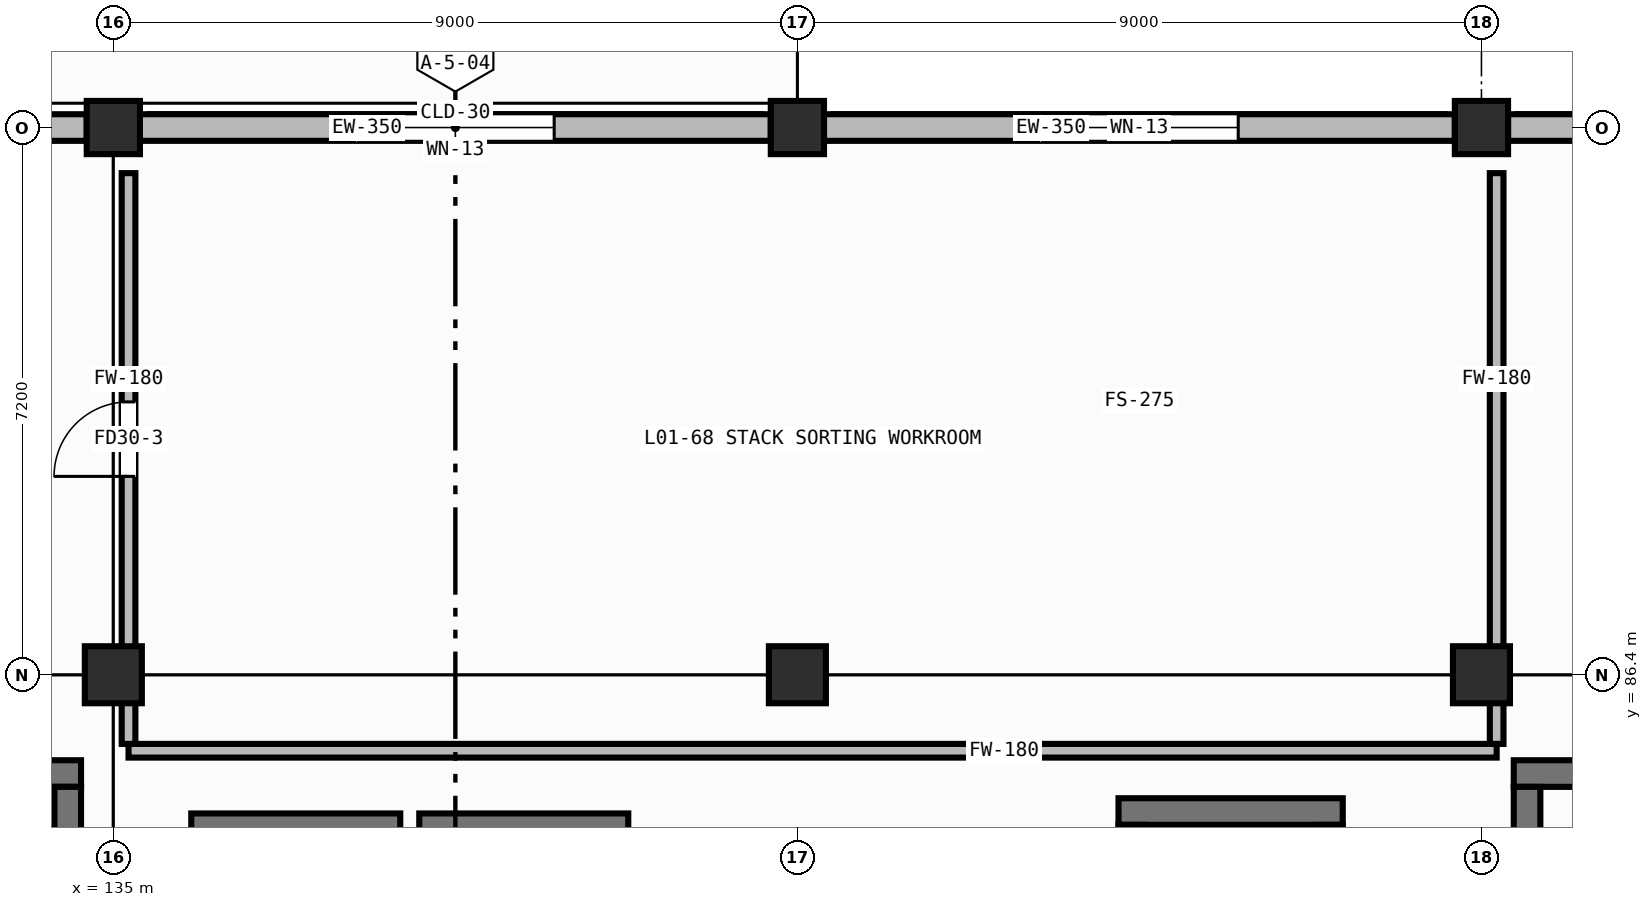
"""IFC4 building model, lengths in metres.
Left out: names, types, materials, properties, quantities, classifications, styles, units other than length and angle.
Written with IfcOpenShell. Run it as: python <this file> out.ifc"""

import sys

from ifc_helpers import new_model, si_unit, direction, frame, frame_2d, origin, origin_2d, place, context, subcontext, project, spatial, rectangle, hollow_rectangle, extrude, element, fill, save


model = new_model("IFC4")
c1 = context("Model", 3, precision=1e-05, world=origin(), true_north=direction((0.0, 1.0)))
c2 = subcontext(c1, "Body", "Model", "MODEL_VIEW")
j1 = project(units=[si_unit("LENGTHUNIT", "METRE"), si_unit("PLANEANGLEUNIT", "RADIAN")], contexts=[c1])
p1 = place(None, origin())
s1 = spatial("IfcSite", under=j1, at=p1, CompositionType="ELEMENT")
p2 = place(p1, origin())
s2 = spatial("IfcBuilding", under=s1, at=p2, CompositionType="ELEMENT")
p3 = place(p2, origin())
s3 = spatial("IfcBuildingStorey", under=s2, at=p3, CompositionType="ELEMENT", Elevation=0.0)
p4 = place(p3, frame((135.0, 86.4, 0.0), z_axis=(0.0, 0.0, 1.0), x_axis=(1.0, 0.0, 0.0)))
e1 = element("IfcColumn", 1, at=p4, inside=s3, PredefinedType="COLUMN", context=c2, shape_type="SweptSolid", body=[
    extrude(hollow_rectangle(XDim=0.75, YDim=0.75, WallThickness=0.032, at=origin_2d()), origin(), (0.0, 0.0, 1.0), 4.8),
])
p5 = place(p3, frame((135.0, 93.6, 0.0), z_axis=(0.0, 0.0, 1.0), x_axis=(1.0, 0.0, 0.0)))
e2 = element("IfcColumn", 2, at=p5, inside=s3, PredefinedType="COLUMN", context=c2, shape_type="SweptSolid", body=[
    extrude(hollow_rectangle(XDim=0.7, YDim=0.7, WallThickness=0.028, at=origin_2d()), origin(), (0.0, 0.0, 1.0), 4.8),
])
p6 = place(p3, frame((144.0, 86.4, 0.0), z_axis=(0.0, 0.0, 1.0), x_axis=(1.0, 0.0, 0.0)))
e3 = element("IfcColumn", 3, at=p6, inside=s3, PredefinedType="COLUMN", context=c2, shape_type="SweptSolid", body=[
    extrude(hollow_rectangle(XDim=0.75, YDim=0.75, WallThickness=0.032, at=origin_2d()), origin(), (0.0, 0.0, 1.0), 4.8),
])
p7 = place(p3, frame((144.0, 93.6, 0.0), z_axis=(0.0, 0.0, 1.0), x_axis=(1.0, 0.0, 0.0)))
e4 = element("IfcColumn", 4, at=p7, inside=s3, PredefinedType="COLUMN", context=c2, shape_type="SweptSolid", body=[
    extrude(hollow_rectangle(XDim=0.7, YDim=0.7, WallThickness=0.028, at=origin_2d()), origin(), (0.0, 0.0, 1.0), 4.8),
])
p8 = place(p3, frame((153.0, 86.4, 0.0), z_axis=(0.0, 0.0, 1.0), x_axis=(1.0, 0.0, 0.0)))
e5 = element("IfcColumn", 5, at=p8, inside=s3, PredefinedType="COLUMN", context=c2, shape_type="SweptSolid", body=[
    extrude(hollow_rectangle(XDim=0.75, YDim=0.75, WallThickness=0.032, at=origin_2d()), origin(), (0.0, 0.0, 1.0), 4.8),
])
p9 = place(p3, frame((153.0, 93.6, 0.0), z_axis=(0.0, 0.0, 1.0), x_axis=(1.0, 0.0, 0.0)))
e6 = element("IfcColumn", 6, at=p9, inside=s3, PredefinedType="COLUMN", context=c2, shape_type="SweptSolid", body=[
    extrude(hollow_rectangle(XDim=0.7, YDim=0.7, WallThickness=0.028, at=origin_2d()), origin(), (0.0, 0.0, 1.0), 4.8),
])
p10 = place(p3, frame((134.65, 93.6, 0.0), z_axis=(0.0, 0.0, 1.0), x_axis=(-1.0, 0.0, 0.0)))
e7 = element("IfcWall", 7, at=p10, inside=s3, PredefinedType="STANDARD", context=c2, shape_type="SweptSolid", body=[
    extrude(rectangle(XDim=8.3, YDim=0.35, at=frame_2d((4.15, 0.0))), origin(), (0.0, 0.0, 1.0), 4.055),
])
p11 = place(p10, frame((3.225, 0.0, 0.0)))
e8 = element("IfcOpeningElement", 8, at=p11, cuts=e7, PredefinedType="OPENING", context=c2, shape_type="SweptSolid", body=[
    extrude(rectangle(XDim=1.85, YDim=2.35, at=frame_2d((0.925, 1.175))), frame((0.0, 0.187, 0.0), z_axis=(0.0, -1.0, 0.0), x_axis=(1.0, 0.0, 0.0)), (0.0, 0.0, 1.0), 0.374),
])
p12 = place(p3, frame((143.65, 93.6, 0.0), z_axis=(0.0, 0.0, 1.0), x_axis=(-1.0, 0.0, 0.0)))
e9 = element("IfcWall", 9, at=p12, inside=s3, PredefinedType="STANDARD", context=c2, shape_type="SweptSolid", body=[
    extrude(rectangle(XDim=8.3, YDim=0.35, at=frame_2d((4.15, 0.0))), origin(), (0.0, 0.0, 1.0), 4.055),
])
p13 = place(p12, frame((2.85, 0.0, 0.85)))
e10 = element("IfcOpeningElement", 10, at=p13, cuts=e9, PredefinedType="OPENING", context=c2, shape_type="SweptSolid", body=[
    extrude(rectangle(XDim=2.6, YDim=1.6, at=frame_2d((1.3, 0.8))), frame((0.0, 0.187, 0.0), z_axis=(0.0, -1.0, 0.0), x_axis=(1.0, 0.0, 0.0)), (0.0, 0.0, 1.0), 0.374),
])
p14 = place(p3, frame((152.65, 93.6, 0.0), z_axis=(0.0, 0.0, 1.0), x_axis=(-1.0, 0.0, 0.0)))
e11 = element("IfcWall", 11, at=p14, inside=s3, PredefinedType="STANDARD", context=c2, shape_type="SweptSolid", body=[
    extrude(rectangle(XDim=8.3, YDim=0.35, at=frame_2d((4.15, 0.0))), origin(), (0.0, 0.0, 1.0), 4.055),
])
p15 = place(p14, frame((2.85, 0.0, 0.85)))
e12 = element("IfcOpeningElement", 12, at=p15, cuts=e11, PredefinedType="OPENING", context=c2, shape_type="SweptSolid", body=[
    extrude(rectangle(XDim=2.6, YDim=1.6, at=frame_2d((1.3, 0.8))), frame((0.0, 0.187, 0.0), z_axis=(0.0, -1.0, 0.0), x_axis=(1.0, 0.0, 0.0)), (0.0, 0.0, 1.0), 0.374),
])
p16 = place(p3, frame((161.65, 93.6, 0.0), z_axis=(0.0, 0.0, 1.0), x_axis=(-1.0, 0.0, 0.0)))
e13 = element("IfcWall", 13, at=p16, inside=s3, PredefinedType="STANDARD", context=c2, shape_type="SweptSolid", body=[
    extrude(rectangle(XDim=8.3, YDim=0.35, at=frame_2d((4.15, 0.0))), origin(), (0.0, 0.0, 1.0), 4.055),
])
p17 = place(p16, frame((2.85, 0.0, 0.85)))
e14 = element("IfcOpeningElement", 14, at=p17, cuts=e13, PredefinedType="OPENING", context=c2, shape_type="SweptSolid", body=[
    extrude(rectangle(XDim=2.6, YDim=1.6, at=frame_2d((1.3, 0.8))), frame((0.0, 0.187, 0.0), z_axis=(0.0, -1.0, 0.0), x_axis=(1.0, 0.0, 0.0)), (0.0, 0.0, 1.0), 0.374),
])
p18 = place(p3, frame((126.425, 85.1, 0.0), z_axis=(0.0, 0.0, 1.0), x_axis=(1.0, 0.0, 0.0)))
e15 = element("IfcWall", 15, at=p18, inside=s3, PredefinedType="SHEAR", context=c2, shape_type="SweptSolid", body=[
    extrude(rectangle(XDim=8.15, YDim=0.35, at=frame_2d((4.075, 0.0))), origin(), (0.0, 0.0, 1.0), 4.555),
])
p19 = place(p3, frame((134.4, 81.375, 0.0), z_axis=(0.0, 0.0, 1.0), x_axis=(0.0, 1.0, 0.0)))
e16 = element("IfcWall", 16, at=p19, inside=s3, PredefinedType="SHEAR", context=c2, shape_type="SweptSolid", body=[
    extrude(rectangle(XDim=3.55, YDim=0.35, at=frame_2d((1.775, 0.0))), origin(), (0.0, 0.0, 1.0), 4.555),
])
p20 = place(p3, frame((153.425, 85.1, 0.0), z_axis=(0.0, 0.0, 1.0), x_axis=(1.0, 0.0, 0.0)))
e17 = element("IfcWall", 17, at=p20, inside=s3, PredefinedType="SHEAR", context=c2, shape_type="SweptSolid", body=[
    extrude(rectangle(XDim=8.15, YDim=0.35, at=frame_2d((4.075, 0.0))), origin(), (0.0, 0.0, 1.0), 4.555),
])
p21 = place(p3, frame((153.6, 81.375, 0.0), z_axis=(0.0, 0.0, 1.0), x_axis=(0.0, 1.0, 0.0)))
e18 = element("IfcWall", 18, at=p21, inside=s3, PredefinedType="SHEAR", context=c2, shape_type="SweptSolid", body=[
    extrude(rectangle(XDim=3.55, YDim=0.35, at=frame_2d((1.775, 0.0))), origin(), (0.0, 0.0, 1.0), 4.555),
])
for number, where, z_axis, x_axis in (
    (19, (136.025, 84.4, 0.0), (0.0, 0.0, 1.0), (1.0, 0.0, 0.0)),
    (20, (139.025, 84.4, 0.0), (0.0, 0.0, 1.0), (1.0, 0.0, 0.0)),
):
    element("IfcWall", number, at=place(p3, frame(where, z_axis=z_axis, x_axis=x_axis)), inside=s3, PredefinedType="SHEAR", context=c2, shape_type="SweptSolid", body=[
        extrude(rectangle(XDim=2.75, YDim=0.35, at=frame_2d((1.375, 0.0))), origin(), (0.0, 0.0, 1.0), 4.555),
    ])
p22 = place(p3, frame((148.225, 84.6, 0.0), z_axis=(0.0, 0.0, 1.0), x_axis=(1.0, 0.0, 0.0)))
e21 = element("IfcWall", 21, at=p22, inside=s3, PredefinedType="SHEAR", context=c2, shape_type="SweptSolid", body=[
    extrude(rectangle(XDim=2.95, YDim=0.35, at=frame_2d((1.475, 0.0))), origin(), (0.0, 0.0, 1.0), 4.555),
])
for number, where, z_axis, x_axis in (
    (22, (148.4, 81.375, 0.0), (0.0, 0.0, 1.0), (0.0, 1.0, 0.0)),
    (23, (151.0, 81.375, 0.0), (0.0, 0.0, 1.0), (0.0, 1.0, 0.0)),
):
    element("IfcWall", number, at=place(p3, frame(where, z_axis=z_axis, x_axis=x_axis)), inside=s3, PredefinedType="SHEAR", context=c2, shape_type="SweptSolid", body=[
        extrude(rectangle(XDim=3.05, YDim=0.35, at=frame_2d((1.525, 0.0))), origin(), (0.0, 0.0, 1.0), 4.555),
    ])
p23 = place(p3, frame((135.2, 85.4, 0.0), z_axis=(0.0, 0.0, 1.0), x_axis=(1.0, 0.0, 0.0)))
e24 = element("IfcWall", 24, at=p23, inside=s3, PredefinedType="PARTITIONING", context=c2, shape_type="SweptSolid", body=[
    extrude(rectangle(XDim=18.0, YDim=0.18, at=frame_2d((9.0, 0.0))), origin(), (0.0, 0.0, 1.0), 4.555),
])
p24 = place(p3, frame((135.2, 85.49, 0.0), z_axis=(0.0, 0.0, 1.0), x_axis=(0.0, 1.0, 0.0)))
e25 = element("IfcWall", 25, at=p24, inside=s3, PredefinedType="PARTITIONING", context=c2, shape_type="SweptSolid", body=[
    extrude(rectangle(XDim=7.51, YDim=0.18, at=frame_2d((3.755, 0.0))), origin(), (0.0, 0.0, 1.0), 3.835),
])
p25 = place(p24, frame((3.52, 0.0, 0.0)))
e26 = element("IfcOpeningElement", 26, at=p25, cuts=e25, PredefinedType="OPENING", context=c2, shape_type="SweptSolid", body=[
    extrude(rectangle(XDim=0.98, YDim=2.02, at=frame_2d((0.49, 1.01))), frame((0.0, 0.102, 0.0), z_axis=(0.0, -1.0, 0.0), x_axis=(1.0, 0.0, 0.0)), (0.0, 0.0, 1.0), 0.204),
])
p26 = place(p3, frame((153.2, 85.49, 0.0), z_axis=(0.0, 0.0, 1.0), x_axis=(0.0, 1.0, 0.0)))
e27 = element("IfcWall", 27, at=p26, inside=s3, PredefinedType="PARTITIONING", context=c2, shape_type="SweptSolid", body=[
    extrude(rectangle(XDim=7.51, YDim=0.18, at=frame_2d((3.755, 0.0))), origin(), (0.0, 0.0, 1.0), 3.835),
])
p27 = place(p13, origin())
e28 = element("IfcWindow", 28, at=p27, inside=s3, PartitioningType="DOUBLE_PANEL_VERTICAL", PredefinedType="WINDOW", context=c2, shape_type="SweptSolid", body=[
    extrude(rectangle(XDim=2.6, YDim=1.6, at=frame_2d((1.3, 0.8))), frame((0.0, 0.03, 0.0), z_axis=(0.0, -1.0, 0.0), x_axis=(1.0, 0.0, 0.0)), (0.0, 0.0, 1.0), 0.06),
])
fill(e10, e28)
p28 = place(p15, origin())
e29 = element("IfcWindow", 29, at=p28, inside=s3, PartitioningType="DOUBLE_PANEL_VERTICAL", PredefinedType="WINDOW", context=c2, shape_type="SweptSolid", body=[
    extrude(rectangle(XDim=2.6, YDim=1.6, at=frame_2d((1.3, 0.8))), frame((0.0, 0.03, 0.0), z_axis=(0.0, -1.0, 0.0), x_axis=(1.0, 0.0, 0.0)), (0.0, 0.0, 1.0), 0.06),
])
fill(e12, e29)
p29 = place(p25, origin())
e30 = element("IfcDoor", 30, at=p29, inside=s3, OperationType="SINGLE_SWING_LEFT", PredefinedType="DOOR", context=c2, shape_type="SweptSolid", body=[
    extrude(rectangle(XDim=0.98, YDim=2.02, at=frame_2d((0.49, 1.01))), frame((0.0, 0.025, 0.0), z_axis=(0.0, -1.0, 0.0), x_axis=(1.0, 0.0, 0.0)), (0.0, 0.0, 1.0), 0.05),
])
fill(e26, e30)
save(model, sys.argv[1])
